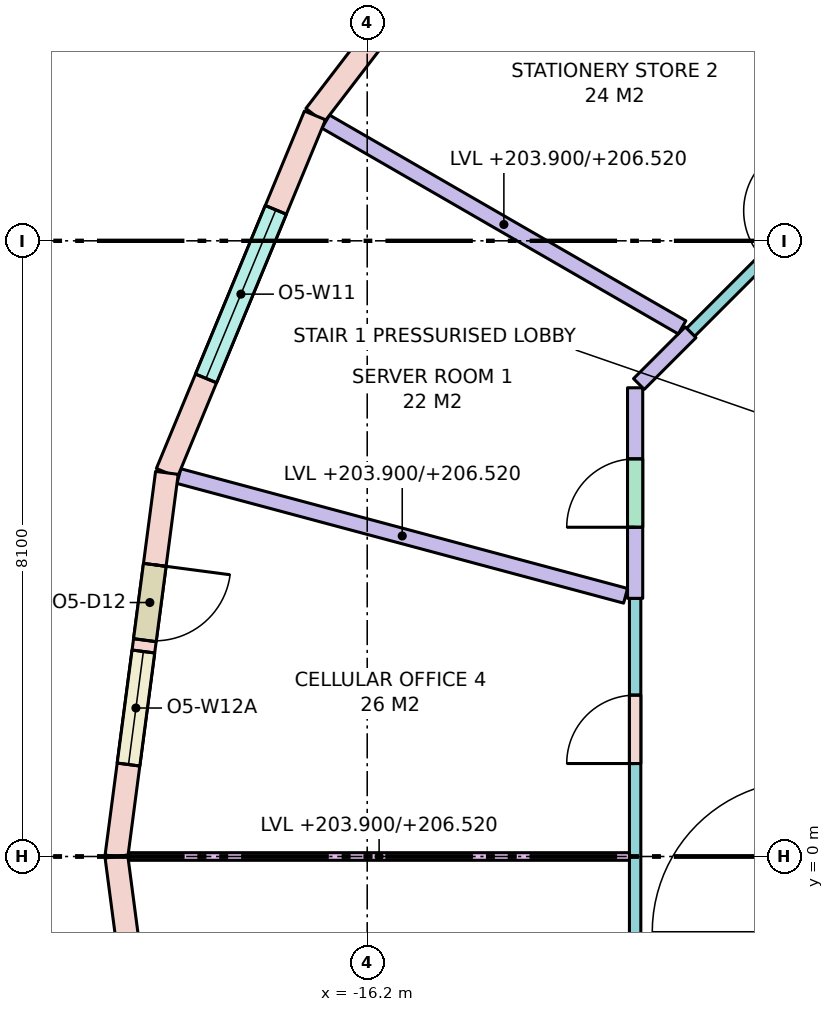
"""IFC4 building model, lengths in metres.
Left out: names, types, materials, properties, quantities, classifications, styles, units other than length and angle.
Written with IfcOpenShell. Run it as: python <this file> out.ifc"""

import sys

from ifc_helpers import new_model, si_unit, direction, frame, frame_2d, origin, place, context, subcontext, project, spatial, rectangle, extrude, element, fill, save


model = new_model("IFC4")
c1 = context("Model", 3, precision=1e-05, world=origin(), true_north=direction((0.0, 1.0)))
c2 = subcontext(c1, "Body", "Model", "MODEL_VIEW")
j1 = project(units=[si_unit("LENGTHUNIT", "METRE"), si_unit("PLANEANGLEUNIT", "RADIAN")], contexts=[c1])
p1 = place(None, origin())
s1 = spatial("IfcSite", under=j1, at=p1, CompositionType="ELEMENT")
p2 = place(p1, origin())
s2 = spatial("IfcBuilding", under=s1, at=p2, CompositionType="ELEMENT")
p3 = place(p2, frame((0.0, 0.0, 203.9)))
s3 = spatial("IfcBuildingStorey", under=s2, at=p3, CompositionType="ELEMENT", Elevation=203.9)
p4 = place(p3, frame((-13.789, 13.789, 0.0), z_axis=(0.0, 0.0, 1.0), x_axis=(-0.608757714995, -0.79335619014, 0.0)))
e1 = element("IfcWall", 1, at=p4, inside=s3, PredefinedType="STANDARD", context=c2, shape_type="SweptSolid", body=[
    extrude(rectangle(XDim=5.091, YDim=0.3, at=frame_2d((2.545, 0.0))), origin(), (0.0, 0.0, 1.0), 3.42),
])
p5 = place(p4, frame((1.22, 0.0, 0.0)))
e2 = element("IfcOpeningElement", 2, at=p5, cuts=e1, PredefinedType="OPENING", context=c2, shape_type="SweptSolid", body=[
    extrude(rectangle(XDim=1.0, YDim=2.4, at=frame_2d((0.5, 1.2))), frame((0.0, 0.16, 0.0), z_axis=(0.0, -1.0, 0.0), x_axis=(1.0, 0.0, 0.0)), (0.0, 0.0, 1.0), 0.32),
])
p6 = place(p4, frame((2.37, 0.0, 0.8)))
e3 = element("IfcOpeningElement", 3, at=p6, cuts=e1, PredefinedType="OPENING", context=c2, shape_type="SweptSolid", body=[
    extrude(rectangle(XDim=1.5, YDim=2.4, at=frame_2d((0.75, 1.2))), frame((0.0, 0.16, 0.0), z_axis=(0.0, -1.0, 0.0), x_axis=(1.0, 0.0, 0.0)), (0.0, 0.0, 1.0), 0.32),
])
p7 = place(p3, frame((-16.887, 9.75, 0.0), z_axis=(0.0, 0.0, 1.0), x_axis=(-0.382724538613, -0.923862504675, 0.0)))
e4 = element("IfcWall", 4, at=p7, inside=s3, PredefinedType="STANDARD", context=c2, shape_type="SweptSolid", body=[
    extrude(rectangle(XDim=5.091, YDim=0.3, at=frame_2d((2.545, 0.0))), origin(), (0.0, 0.0, 1.0), 3.42),
])
p8 = place(p7, frame((1.345, 0.0, 0.8)))
e5 = element("IfcOpeningElement", 5, at=p8, cuts=e4, PredefinedType="OPENING", context=c2, shape_type="SweptSolid", body=[
    extrude(rectangle(XDim=2.4, YDim=2.4, at=frame_2d((1.2, 1.2))), frame((0.0, 0.16, 0.0), z_axis=(0.0, -1.0, 0.0), x_axis=(1.0, 0.0, 0.0)), (0.0, 0.0, 1.0), 0.32),
])
p9 = place(p3, frame((-18.836, 5.047, 0.0), z_axis=(0.0, 0.0, 1.0), x_axis=(-0.130495451964, -0.99144890792, 0.0)))
e6 = element("IfcWall", 6, at=p9, inside=s3, PredefinedType="STANDARD", context=c2, shape_type="SweptSolid", body=[
    extrude(rectangle(XDim=5.091, YDim=0.3, at=frame_2d((2.545, 0.0))), origin(), (0.0, 0.0, 1.0), 3.42),
])
p10 = place(p9, frame((1.22, 0.0, 0.0)))
e7 = element("IfcOpeningElement", 7, at=p10, cuts=e6, PredefinedType="OPENING", context=c2, shape_type="SweptSolid", body=[
    extrude(rectangle(XDim=1.0, YDim=2.4, at=frame_2d((0.5, 1.2))), frame((0.0, 0.16, 0.0), z_axis=(0.0, -1.0, 0.0), x_axis=(1.0, 0.0, 0.0)), (0.0, 0.0, 1.0), 0.32),
])
p11 = place(p9, frame((2.37, 0.0, 0.8)))
e8 = element("IfcOpeningElement", 8, at=p11, cuts=e6, PredefinedType="OPENING", context=c2, shape_type="SweptSolid", body=[
    extrude(rectangle(XDim=1.5, YDim=2.4, at=frame_2d((0.75, 1.2))), frame((0.0, 0.16, 0.0), z_axis=(0.0, -1.0, 0.0), x_axis=(1.0, 0.0, 0.0)), (0.0, 0.0, 1.0), 0.32),
])
p12 = place(p3, frame((-19.5, 0.0, 0.0), z_axis=(0.0, 0.0, 1.0), x_axis=(0.130495451964, -0.99144890792, 0.0)))
e9 = element("IfcWall", 9, at=p12, inside=s3, PredefinedType="STANDARD", context=c2, shape_type="SweptSolid", body=[
    extrude(rectangle(XDim=5.091, YDim=0.3, at=frame_2d((2.545, 0.0))), origin(), (0.0, 0.0, 1.0), 3.42),
])
p13 = place(p12, frame((1.345, 0.0, 0.8)))
e10 = element("IfcOpeningElement", 10, at=p13, cuts=e9, PredefinedType="OPENING", context=c2, shape_type="SweptSolid", body=[
    extrude(rectangle(XDim=2.4, YDim=2.4, at=frame_2d((1.2, 1.2))), frame((0.0, 0.16, 0.0), z_axis=(0.0, -1.0, 0.0), x_axis=(1.0, 0.0, 0.0)), (0.0, 0.0, 1.0), 0.32),
])
p14 = place(p3, frame((-12.675, -6.167, 0.0), z_axis=(0.0, 0.0, 1.0), x_axis=(0.0, 1.0, 0.0)))
e11 = element("IfcWall", 11, at=p14, inside=s3, PredefinedType="PARTITIONING", context=c2, shape_type="SweptSolid", body=[
    extrude(rectangle(XDim=9.563, YDim=0.15, at=frame_2d((4.781, 0.0))), origin(), (0.0, 0.0, 1.0), 2.62),
])
p15 = place(p14, frame((7.39, 0.0, 0.0)))
e12 = element("IfcOpeningElement", 12, at=p15, cuts=e11, PredefinedType="OPENING", context=c2, shape_type="SweptSolid", body=[
    extrude(rectangle(XDim=0.9, YDim=2.1, at=frame_2d((0.45, 1.05))), frame((0.0, 0.085, 0.0), z_axis=(0.0, -1.0, 0.0), x_axis=(1.0, 0.0, 0.0)), (0.0, 0.0, 1.0), 0.17),
])
p16 = place(p3, frame((-12.675, 3.396, 0.0), z_axis=(0.0, 0.0, 1.0), x_axis=(0.0, 1.0, 0.0)))
e13 = element("IfcWall", 13, at=p16, inside=s3, PredefinedType="PARTITIONING", context=c2, shape_type="SweptSolid", body=[
    extrude(rectangle(XDim=2.77, YDim=0.2, at=frame_2d((1.385, 0.0))), origin(), (0.0, 0.0, 1.0), 2.62),
])
p17 = place(p16, frame((0.935, 0.0, 0.0)))
e14 = element("IfcOpeningElement", 14, at=p17, cuts=e13, PredefinedType="OPENING", context=c2, shape_type="SweptSolid", body=[
    extrude(rectangle(XDim=0.9, YDim=2.1, at=frame_2d((0.45, 1.05))), frame((0.0, 0.11, 0.0), z_axis=(0.0, -1.0, 0.0), x_axis=(1.0, 0.0, 0.0)), (0.0, 0.0, 1.0), 0.22),
])
p18 = place(p3, frame((-12.625, 6.216, 0.0), z_axis=(0.0, 0.0, 1.0), x_axis=(0.707106781187, 0.707106781187, 0.0)))
e15 = element("IfcWall", 15, at=p18, inside=s3, PredefinedType="PARTITIONING", context=c2, shape_type="SweptSolid", body=[
    extrude(rectangle(XDim=0.962, YDim=0.2, at=frame_2d((0.481, 0.0))), origin(), (0.0, 0.0, 1.0), 2.62),
])
p19 = place(p3, frame((-11.945, 6.896, 0.0), z_axis=(0.0, 0.0, 1.0), x_axis=(0.707106781187, 0.707106781187, 0.0)))
e16 = element("IfcWall", 16, at=p19, inside=s3, PredefinedType="PARTITIONING", context=c2, shape_type="SweptSolid", body=[
    extrude(rectangle(XDim=5.291, YDim=0.15, at=frame_2d((2.646, 0.0))), origin(), (0.0, 0.0, 1.0), 2.62),
])
p20 = place(p19, frame((3.956, 0.0, 0.0)))
e17 = element("IfcOpeningElement", 17, at=p20, cuts=e16, PredefinedType="OPENING", context=c2, shape_type="SweptSolid", body=[
    extrude(rectangle(XDim=0.9, YDim=2.1, at=frame_2d((0.45, 1.05))), frame((0.0, 0.085, 0.0), z_axis=(0.0, -1.0, 0.0), x_axis=(1.0, 0.0, 0.0)), (0.0, 0.0, 1.0), 0.17),
])
p21 = place(p19, frame((1.36, 0.0, 0.0)))
e18 = element("IfcOpeningElement", 18, at=p21, cuts=e16, PredefinedType="OPENING", context=c2, shape_type="SweptSolid", body=[
    extrude(rectangle(XDim=0.9, YDim=2.1, at=frame_2d((0.45, 1.05))), frame((0.0, 0.085, 0.0), z_axis=(0.0, -1.0, 0.0), x_axis=(1.0, 0.0, 0.0)), (0.0, 0.0, 1.0), 0.17),
])
p22 = place(p3, frame((-9.474, 9.474, 0.0), z_axis=(0.0, 0.0, 1.0), x_axis=(-0.707106781187, 0.707106781187, 0.0)))
e19 = element("IfcWall", 19, at=p22, inside=s3, PredefinedType="PARTITIONING", context=c2, shape_type="SweptSolid", body=[
    extrude(rectangle(XDim=5.938, YDim=0.1, at=frame_2d((2.969, 0.0))), origin(), (0.0, 0.0, 1.0), 2.62),
])
p23 = place(p3, frame((-12.058, 6.961, 0.0), z_axis=(0.0, 0.0, 1.0), x_axis=(-0.86601436245, 0.500019123664, 0.0)))
e20 = element("IfcWall", 20, at=p23, inside=s3, PredefinedType="PARTITIONING", context=c2, shape_type="SweptSolid", body=[
    extrude(rectangle(XDim=5.414, YDim=0.2, at=frame_2d((2.707, 0.0))), origin(), (0.0, 0.0, 1.0), 2.62),
])
p24 = place(p3, frame((-12.801, 3.43, 0.0), z_axis=(0.0, 0.0, 1.0), x_axis=(-0.965929245953, 0.258806282407, 0.0)))
e21 = element("IfcWall", 21, at=p24, inside=s3, PredefinedType="PARTITIONING", context=c2, shape_type="SweptSolid", body=[
    extrude(rectangle(XDim=6.084, YDim=0.2, at=frame_2d((3.042, 0.0))), origin(), (0.0, 0.0, 1.0), 2.62),
])
p25 = place(p3, frame((-12.75, 0.0, 0.0), z_axis=(0.0, 0.0, 1.0), x_axis=(-1.0, 0.0, 0.0)))
e22 = element("IfcWall", 22, at=p25, inside=s3, PredefinedType="PARTITIONING", context=c2, shape_type="SweptSolid", body=[
    extrude(rectangle(XDim=6.587, YDim=0.1, at=frame_2d((3.293, 0.0))), origin(), (0.0, 0.0, 1.0), 2.62),
])
p26 = place(p8, origin())
e23 = element("IfcWindow", 23, at=p26, inside=s3, PartitioningType="SINGLE_PANEL", PredefinedType="WINDOW", context=c2, shape_type="SweptSolid", body=[
    extrude(rectangle(XDim=2.4, YDim=2.4, at=frame_2d((1.2, 1.2))), frame((0.0, 0.03, 0.0), z_axis=(0.0, -1.0, 0.0), x_axis=(1.0, 0.0, 0.0)), (0.0, 0.0, 1.0), 0.06),
])
fill(e5, e23)
p27 = place(p10, origin())
e24 = element("IfcDoor", 24, at=p27, inside=s3, OperationType="SINGLE_SWING_LEFT", PredefinedType="DOOR", context=c2, shape_type="SweptSolid", body=[
    extrude(rectangle(XDim=1.0, YDim=2.4, at=frame_2d((0.5, 1.2))), frame((0.0, 0.025, 0.0), z_axis=(0.0, -1.0, 0.0), x_axis=(1.0, 0.0, 0.0)), (0.0, 0.0, 1.0), 0.05),
])
fill(e7, e24)
p28 = place(p11, origin())
e25 = element("IfcWindow", 25, at=p28, inside=s3, PartitioningType="SINGLE_PANEL", PredefinedType="WINDOW", context=c2, shape_type="SweptSolid", body=[
    extrude(rectangle(XDim=1.5, YDim=2.4, at=frame_2d((0.75, 1.2))), frame((0.0, 0.03, 0.0), z_axis=(0.0, -1.0, 0.0), x_axis=(1.0, 0.0, 0.0)), (0.0, 0.0, 1.0), 0.06),
])
fill(e8, e25)
p29 = place(p17, origin())
e26 = element("IfcDoor", 26, at=p29, inside=s3, OperationType="SINGLE_SWING_LEFT", PredefinedType="DOOR", context=c2, shape_type="SweptSolid", body=[
    extrude(rectangle(XDim=0.9, YDim=2.1, at=frame_2d((0.45, 1.05))), frame((0.0, 0.025, 0.0), z_axis=(0.0, -1.0, 0.0), x_axis=(1.0, 0.0, 0.0)), (0.0, 0.0, 1.0), 0.05),
])
fill(e14, e26)
p30 = place(p15, origin())
e27 = element("IfcDoor", 27, at=p30, inside=s3, OperationType="SINGLE_SWING_LEFT", PredefinedType="DOOR", context=c2, shape_type="SweptSolid", body=[
    extrude(rectangle(XDim=0.9, YDim=2.1, at=frame_2d((0.45, 1.05))), frame((0.0, 0.025, 0.0), z_axis=(0.0, -1.0, 0.0), x_axis=(1.0, 0.0, 0.0)), (0.0, 0.0, 1.0), 0.05),
])
fill(e12, e27)
save(model, sys.argv[1])
